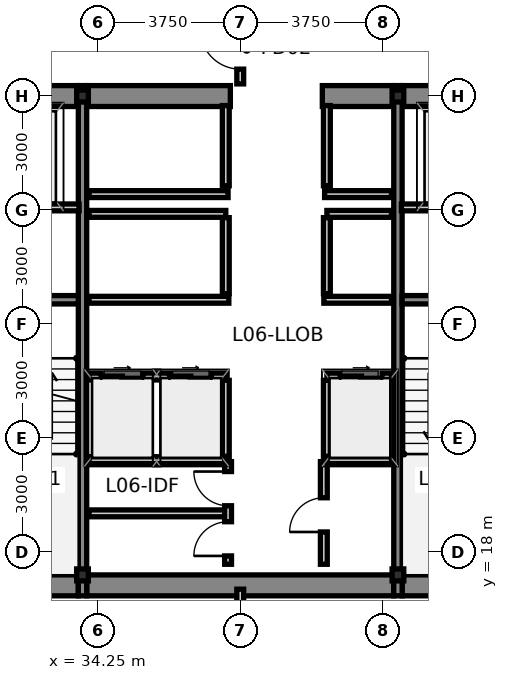
"""IFC4 building model, lengths in metres.
Left out: names, types, materials, properties, quantities, classifications, styles, units other than length and angle.
Written with IfcOpenShell. Run it as: python <this file> out.ifc"""

import sys

from ifc_helpers import new_model, si_unit, direction, frame, frame_2d, origin, origin_2d, place, context, subcontext, project, spatial, rectangle, i_section, extrude, source, transform, mapped, element, fill, save


model = new_model("IFC4")
c1 = context("Model", 3, precision=1e-05, world=origin(), true_north=direction((0.0, 1.0)))
c2 = subcontext(c1, "Body", "Model", "MODEL_VIEW")
j1 = project(units=[si_unit("LENGTHUNIT", "METRE"), si_unit("PLANEANGLEUNIT", "RADIAN")], contexts=[c1])
p1 = place(None, origin())
s1 = spatial("IfcSite", under=j1, at=p1, CompositionType="ELEMENT")
p2 = place(p1, origin())
s2 = spatial("IfcBuilding", under=s1, at=p2, CompositionType="ELEMENT")
p3 = place(p2, frame((0.0, 0.0, 27.6)))
s3 = spatial("IfcBuildingStorey", under=s2, at=p3, CompositionType="ELEMENT", Elevation=27.6)
m1 = source(origin(), c2, "Body", "SweptSolid", [
    extrude(i_section(OverallWidth=0.307, OverallDepth=0.315, WebThickness=0.012, FlangeThickness=0.019, at=origin_2d()), origin(), (0.0, 0.0, 1.0), 3.65),
])
for number, where, z_axis, x_axis in (
    (1, (33.85, 17.4, 0.0), (0.0, 0.0, 1.0), (1.0, 0.0, 0.0)),
    (2, (42.15, 17.4, 0.0), (0.0, 0.0, 1.0), (1.0, 0.0, 0.0)),
    (3, (33.85, 30.0, 0.0), (0.0, 0.0, 1.0), (1.0, 0.0, 0.0)),
    (4, (42.15, 30.0, 0.0), (0.0, 0.0, 1.0), (1.0, 0.0, 0.0)),
):
    element("IfcColumn", number, at=place(p3, frame(where, z_axis=z_axis, x_axis=x_axis)), inside=s3, PredefinedType="COLUMN", context=c2, shape_type="MappedRepresentation", body=[
        mapped(m1, transform((0.0, 0.0, 0.0), scale=1.0)),
    ])
p4 = place(p3, frame((30.84, 17.125, 0.0), z_axis=(0.0, 0.0, 1.0), x_axis=(1.0, 0.0, 0.0)))
e5 = element("IfcWall", 5, at=p4, inside=s3, PredefinedType="SHEAR", context=c2, shape_type="SweptSolid", body=[
    extrude(rectangle(XDim=2.9, YDim=0.55, at=frame_2d((1.45, 0.0))), origin(), (0.0, 0.0, 1.0), 3.65),
])
p5 = place(p3, frame((33.96, 17.125, 0.0), z_axis=(0.0, 0.0, 1.0), x_axis=(1.0, 0.0, 0.0)))
e6 = element("IfcWall", 6, at=p5, inside=s3, PredefinedType="SHEAR", context=c2, shape_type="SweptSolid", body=[
    extrude(rectangle(XDim=8.08, YDim=0.55, at=frame_2d((4.04, 0.0))), origin(), (0.0, 0.0, 1.0), 3.65),
])
for number, where, z_axis, x_axis in (
    (7, (42.26, 17.125, 0.0), (0.0, 0.0, 1.0), (1.0, 0.0, 0.0)),
    (8, (30.84, 30.0, 0.0), (0.0, 0.0, 1.0), (1.0, 0.0, 0.0)),
):
    element("IfcWall", number, at=place(p3, frame(where, z_axis=z_axis, x_axis=x_axis)), inside=s3, PredefinedType="SHEAR", context=c2, shape_type="SweptSolid", body=[
        extrude(rectangle(XDim=2.9, YDim=0.55, at=frame_2d((1.45, 0.0))), origin(), (0.0, 0.0, 1.0), 3.65),
    ])
p6 = place(p3, frame((33.96, 30.0, 0.0), z_axis=(0.0, 0.0, 1.0), x_axis=(1.0, 0.0, 0.0)))
e9 = element("IfcWall", 9, at=p6, inside=s3, PredefinedType="SHEAR", context=c2, shape_type="SweptSolid", body=[
    extrude(rectangle(XDim=3.78, YDim=0.55, at=frame_2d((1.89, 0.0))), origin(), (0.0, 0.0, 1.0), 3.65),
])
p7 = place(p3, frame((40.16, 30.0, 0.0), z_axis=(0.0, 0.0, 1.0), x_axis=(1.0, 0.0, 0.0)))
e10 = element("IfcWall", 10, at=p7, inside=s3, PredefinedType="SHEAR", context=c2, shape_type="SweptSolid", body=[
    extrude(rectangle(XDim=1.88, YDim=0.55, at=frame_2d((0.94, 0.0))), origin(), (0.0, 0.0, 1.0), 3.65),
])
p8 = place(p3, frame((42.26, 30.0, 0.0), z_axis=(0.0, 0.0, 1.0), x_axis=(1.0, 0.0, 0.0)))
e11 = element("IfcWall", 11, at=p8, inside=s3, PredefinedType="SHEAR", context=c2, shape_type="SweptSolid", body=[
    extrude(rectangle(XDim=2.9, YDim=0.55, at=frame_2d((1.45, 0.0))), origin(), (0.0, 0.0, 1.0), 3.65),
])
for number, where, z_axis, x_axis in (
    (12, (33.85, 16.85, 0.0), (0.0, 0.0, 1.0), (0.0, 1.0, 0.0)),
    (13, (42.15, 16.85, 0.0), (0.0, 0.0, 1.0), (0.0, 1.0, 0.0)),
):
    element("IfcWall", number, at=place(p3, frame(where, z_axis=z_axis, x_axis=x_axis)), inside=s3, PredefinedType="SHEAR", context=c2, shape_type="SweptSolid", body=[
        extrude(rectangle(XDim=13.425, YDim=0.22, at=frame_2d((6.712, 0.0))), origin(), (0.0, 0.0, 1.0), 3.65),
    ])
for number, where, z_axis, x_axis in (
    (14, (30.84, 24.64, 0.0), (0.0, 0.0, 1.0), (1.0, 0.0, 0.0)),
    (15, (42.26, 24.64, 0.0), (0.0, 0.0, 1.0), (1.0, 0.0, 0.0)),
):
    element("IfcWall", number, at=place(p3, frame(where, z_axis=z_axis, x_axis=x_axis)), inside=s3, PredefinedType="SHEAR", context=c2, shape_type="SweptSolid", body=[
        extrude(rectangle(XDim=2.9, YDim=0.22, at=frame_2d((1.45, 0.0))), origin(), (0.0, 0.0, 1.0), 3.65),
    ])
p9 = place(p3, frame((34.02, 22.62, 0.0), z_axis=(0.0, 0.0, 1.0), x_axis=(1.0, 0.0, 0.0)))
e16 = element("IfcWall", 16, at=p9, inside=s3, PredefinedType="PARTITIONING", context=c2, shape_type="SweptSolid", body=[
    extrude(rectangle(XDim=3.6, YDim=0.18, at=frame_2d((1.8, 0.0))), origin(), (0.0, 0.0, 1.0), 3.4),
])
p10 = place(p9, frame((0.32, 0.0, 0.0)))
e17 = element("IfcOpeningElement", 17, at=p10, cuts=e16, PredefinedType="OPENING", context=c2, shape_type="SweptSolid", body=[
    extrude(rectangle(XDim=1.1, YDim=2.2, at=frame_2d((0.55, 1.1))), frame((0.0, 0.102, 0.0), z_axis=(0.0, -1.0, 0.0), x_axis=(1.0, 0.0, 0.0)), (0.0, 0.0, 1.0), 0.204),
])
p11 = place(p9, frame((2.12, 0.0, 0.0)))
e18 = element("IfcOpeningElement", 18, at=p11, cuts=e16, PredefinedType="OPENING", context=c2, shape_type="SweptSolid", body=[
    extrude(rectangle(XDim=1.1, YDim=2.2, at=frame_2d((0.55, 1.1))), frame((0.0, 0.102, 0.0), z_axis=(0.0, -1.0, 0.0), x_axis=(1.0, 0.0, 0.0)), (0.0, 0.0, 1.0), 0.204),
])
p12 = place(p3, frame((40.28, 22.62, 0.0), z_axis=(0.0, 0.0, 1.0), x_axis=(1.0, 0.0, 0.0)))
e19 = element("IfcWall", 19, at=p12, inside=s3, PredefinedType="PARTITIONING", context=c2, shape_type="SweptSolid", body=[
    extrude(rectangle(XDim=1.7, YDim=0.18, at=frame_2d((0.85, 0.0))), origin(), (0.0, 0.0, 1.0), 3.4),
])
p13 = place(p12, frame((0.35, 0.0, 0.0)))
e20 = element("IfcOpeningElement", 20, at=p13, cuts=e19, PredefinedType="OPENING", context=c2, shape_type="SweptSolid", body=[
    extrude(rectangle(XDim=1.1, YDim=2.2, at=frame_2d((0.55, 1.1))), frame((0.0, 0.102, 0.0), z_axis=(0.0, -1.0, 0.0), x_axis=(1.0, 0.0, 0.0)), (0.0, 0.0, 1.0), 0.204),
])
for number, where, z_axis, x_axis in (
    (21, (37.62, 20.52, 0.0), (0.0, 0.0, 1.0), (0.0, 1.0, 0.0)),
    (22, (40.28, 20.52, 0.0), (0.0, 0.0, 1.0), (0.0, 1.0, 0.0)),
):
    element("IfcWall", number, at=place(p3, frame(where, z_axis=z_axis, x_axis=x_axis)), inside=s3, PredefinedType="PARTITIONING", context=c2, shape_type="SweptSolid", body=[
        extrude(rectangle(XDim=2.0, YDim=0.18, at=frame_2d((1.0, 0.0))), origin(), (0.0, 0.0, 1.0), 3.4),
    ])
p14 = place(p3, frame((34.02, 26.9, 0.0), z_axis=(0.0, 0.0, 1.0), x_axis=(1.0, 0.0, 0.0)))
e23 = element("IfcWall", 23, at=p14, inside=s3, PredefinedType="PARTITIONING", context=c2, shape_type="SweptSolid", body=[
    extrude(rectangle(XDim=3.6, YDim=0.18, at=frame_2d((1.8, 0.0))), origin(), (0.0, 0.0, 1.0), 3.4),
])
p15 = place(p3, frame((40.28, 26.9, 0.0), z_axis=(0.0, 0.0, 1.0), x_axis=(1.0, 0.0, 0.0)))
e24 = element("IfcWall", 24, at=p15, inside=s3, PredefinedType="PARTITIONING", context=c2, shape_type="SweptSolid", body=[
    extrude(rectangle(XDim=1.7, YDim=0.18, at=frame_2d((0.85, 0.0))), origin(), (0.0, 0.0, 1.0), 3.4),
])
for number, where, z_axis, x_axis in (
    (25, (37.62, 24.8, 0.0), (0.0, 0.0, 1.0), (0.0, 1.0, 0.0)),
    (26, (40.28, 24.8, 0.0), (0.0, 0.0, 1.0), (0.0, 1.0, 0.0)),
):
    element("IfcWall", number, at=place(p3, frame(where, z_axis=z_axis, x_axis=x_axis)), inside=s3, PredefinedType="PARTITIONING", context=c2, shape_type="SweptSolid", body=[
        extrude(rectangle(XDim=2.0, YDim=0.18, at=frame_2d((1.0, 0.0))), origin(), (0.0, 0.0, 1.0), 3.4),
    ])
p16 = place(p3, frame((34.02, 24.64, 0.0), z_axis=(0.0, 0.0, 1.0), x_axis=(1.0, 0.0, 0.0)))
e27 = element("IfcWall", 27, at=p16, inside=s3, PredefinedType="PARTITIONING", context=c2, shape_type="SweptSolid", body=[
    extrude(rectangle(XDim=3.68, YDim=0.18, at=frame_2d((1.84, 0.0))), origin(), (0.0, 0.0, 1.0), 3.4),
])
p17 = place(p3, frame((40.2, 24.64, 0.0), z_axis=(0.0, 0.0, 1.0), x_axis=(1.0, 0.0, 0.0)))
e28 = element("IfcWall", 28, at=p17, inside=s3, PredefinedType="PARTITIONING", context=c2, shape_type="SweptSolid", body=[
    extrude(rectangle(XDim=1.78, YDim=0.18, at=frame_2d((0.89, 0.0))), origin(), (0.0, 0.0, 1.0), 3.4),
])
p18 = place(p3, frame((34.02, 27.42, 0.0), z_axis=(0.0, 0.0, 1.0), x_axis=(1.0, 0.0, 0.0)))
e29 = element("IfcWall", 29, at=p18, inside=s3, PredefinedType="PARTITIONING", context=c2, shape_type="SweptSolid", body=[
    extrude(rectangle(XDim=3.66, YDim=0.18, at=frame_2d((1.83, 0.0))), origin(), (0.0, 0.0, 1.0), 3.4),
])
p19 = place(p3, frame((40.22, 27.42, 0.0), z_axis=(0.0, 0.0, 1.0), x_axis=(1.0, 0.0, 0.0)))
e30 = element("IfcWall", 30, at=p19, inside=s3, PredefinedType="PARTITIONING", context=c2, shape_type="SweptSolid", body=[
    extrude(rectangle(XDim=1.76, YDim=0.18, at=frame_2d((0.88, 0.0))), origin(), (0.0, 0.0, 1.0), 3.4),
])
for number, where, z_axis, x_axis in (
    (31, (37.62, 27.64, 0.0), (0.0, 0.0, 1.0), (0.0, 1.0, 0.0)),
    (32, (40.28, 27.64, 0.0), (0.0, 0.0, 1.0), (0.0, 1.0, 0.0)),
):
    element("IfcWall", number, at=place(p3, frame(where, z_axis=z_axis, x_axis=x_axis)), inside=s3, PredefinedType="PARTITIONING", context=c2, shape_type="SweptSolid", body=[
        extrude(rectangle(XDim=2.11, YDim=0.18, at=frame_2d((1.055, 0.0))), origin(), (0.0, 0.0, 1.0), 3.4),
    ])
for number, where, z_axis, x_axis in (
    (33, (30.86, 27.07, 0.0), (0.0, 0.0, 1.0), (1.0, 0.0, 0.0)),
    (34, (42.24, 27.07, 0.0), (0.0, 0.0, 1.0), (1.0, 0.0, 0.0)),
):
    element("IfcWall", number, at=place(p3, frame(where, z_axis=z_axis, x_axis=x_axis)), inside=s3, PredefinedType="PARTITIONING", context=c2, shape_type="SweptSolid", body=[
        extrude(rectangle(XDim=2.9, YDim=0.18, at=frame_2d((1.45, 0.0))), origin(), (0.0, 0.0, 1.0), 3.4),
    ])
p20 = place(p3, frame((34.02, 20.42, 0.0), z_axis=(0.0, 0.0, 1.0), x_axis=(1.0, 0.0, 0.0)))
e35 = element("IfcWall", 35, at=p20, inside=s3, PredefinedType="PARTITIONING", context=c2, shape_type="SweptSolid", body=[
    extrude(rectangle(XDim=3.64, YDim=0.18, at=frame_2d((1.82, 0.0))), origin(), (0.0, 0.0, 1.0), 3.4),
])
p21 = place(p3, frame((40.22, 20.42, 0.0), z_axis=(0.0, 0.0, 1.0), x_axis=(1.0, 0.0, 0.0)))
e36 = element("IfcWall", 36, at=p21, inside=s3, PredefinedType="PARTITIONING", context=c2, shape_type="SweptSolid", body=[
    extrude(rectangle(XDim=1.76, YDim=0.18, at=frame_2d((0.88, 0.0))), origin(), (0.0, 0.0, 1.0), 3.4),
])
p22 = place(p3, frame((34.02, 19.02, 0.0), z_axis=(0.0, 0.0, 1.0), x_axis=(1.0, 0.0, 0.0)))
e37 = element("IfcWall", 37, at=p22, inside=s3, PredefinedType="PARTITIONING", context=c2, shape_type="SweptSolid", body=[
    extrude(rectangle(XDim=3.58, YDim=0.18, at=frame_2d((1.79, 0.0))), origin(), (0.0, 0.0, 1.0), 3.4),
])
p23 = place(p3, frame((37.68, 17.68, 0.0), z_axis=(0.0, 0.0, 1.0), x_axis=(0.0, 1.0, 0.0)))
e38 = element("IfcWall", 38, at=p23, inside=s3, PredefinedType="PARTITIONING", context=c2, shape_type="SweptSolid", body=[
    extrude(rectangle(XDim=2.7, YDim=0.18, at=frame_2d((1.35, 0.0))), origin(), (0.0, 0.0, 1.0), 3.4),
])
p24 = place(p23, frame((0.22, 0.0, 0.0)))
e39 = element("IfcOpeningElement", 39, at=p24, cuts=e38, PredefinedType="OPENING", context=c2, shape_type="SweptSolid", body=[
    extrude(rectangle(XDim=0.9, YDim=2.1, at=frame_2d((0.45, 1.05))), frame((0.0, 0.102, 0.0), z_axis=(0.0, -1.0, 0.0), x_axis=(1.0, 0.0, 0.0)), (0.0, 0.0, 1.0), 0.204),
])
p25 = place(p23, frame((1.54, 0.0, 0.0)))
e40 = element("IfcOpeningElement", 40, at=p25, cuts=e38, PredefinedType="OPENING", context=c2, shape_type="SweptSolid", body=[
    extrude(rectangle(XDim=0.9, YDim=2.1, at=frame_2d((0.45, 1.05))), frame((0.0, 0.102, 0.0), z_axis=(0.0, -1.0, 0.0), x_axis=(1.0, 0.0, 0.0)), (0.0, 0.0, 1.0), 0.204),
])
p26 = place(p3, frame((40.2, 17.68, 0.0), z_axis=(0.0, 0.0, 1.0), x_axis=(0.0, 1.0, 0.0)))
e41 = element("IfcWall", 41, at=p26, inside=s3, PredefinedType="PARTITIONING", context=c2, shape_type="SweptSolid", body=[
    extrude(rectangle(XDim=2.7, YDim=0.18, at=frame_2d((1.35, 0.0))), origin(), (0.0, 0.0, 1.0), 3.4),
])
p27 = place(p26, frame((0.85, 0.0, 0.0)))
e42 = element("IfcOpeningElement", 42, at=p27, cuts=e41, PredefinedType="OPENING", context=c2, shape_type="SweptSolid", body=[
    extrude(rectangle(XDim=0.9, YDim=2.1, at=frame_2d((0.45, 1.05))), frame((0.0, 0.102, 0.0), z_axis=(0.0, -1.0, 0.0), x_axis=(1.0, 0.0, 0.0)), (0.0, 0.0, 1.0), 0.204),
])
p28 = place(p3, frame((38.0, 15.205, 0.0), z_axis=(0.0, 0.0, 1.0), x_axis=(0.0, 1.0, 0.0)))
e43 = element("IfcWall", 43, at=p28, inside=s3, PredefinedType="PARTITIONING", context=c2, shape_type="SweptSolid", body=[
    extrude(rectangle(XDim=1.82, YDim=0.18, at=frame_2d((0.91, 0.0))), origin(), (0.0, 0.0, 1.0), 3.4),
])
p29 = place(p28, frame((0.385, 0.0, 0.0)))
e44 = element("IfcOpeningElement", 44, at=p29, cuts=e43, PredefinedType="OPENING", context=c2, shape_type="SweptSolid", body=[
    extrude(rectangle(XDim=1.05, YDim=2.15, at=frame_2d((0.525, 1.075))), frame((0.0, 0.102, 0.0), z_axis=(0.0, -1.0, 0.0), x_axis=(1.0, 0.0, 0.0)), (0.0, 0.0, 1.0), 0.204),
])
p30 = place(p3, frame((38.0, 30.32, 0.0), z_axis=(0.0, 0.0, 1.0), x_axis=(0.0, 1.0, 0.0)))
e45 = element("IfcWall", 45, at=p30, inside=s3, PredefinedType="PARTITIONING", context=c2, shape_type="SweptSolid", body=[
    extrude(rectangle(XDim=1.825, YDim=0.18, at=frame_2d((0.913, 0.0))), origin(), (0.0, 0.0, 1.0), 3.4),
])
p31 = place(p30, frame((0.388, 0.0, 0.0)))
e46 = element("IfcOpeningElement", 46, at=p31, cuts=e45, PredefinedType="OPENING", context=c2, shape_type="SweptSolid", body=[
    extrude(rectangle(XDim=1.05, YDim=2.15, at=frame_2d((0.525, 1.075))), frame((0.0, 0.102, 0.0), z_axis=(0.0, -1.0, 0.0), x_axis=(1.0, 0.0, 0.0)), (0.0, 0.0, 1.0), 0.204),
])
p32 = place(p10, origin())
e47 = element("IfcDoor", 47, at=p32, inside=s3, OperationType="SLIDING_TO_LEFT", PredefinedType="DOOR", context=c2, shape_type="SweptSolid", body=[
    extrude(rectangle(XDim=1.1, YDim=2.2, at=frame_2d((0.55, 1.1))), frame((0.0, 0.025, 0.0), z_axis=(0.0, -1.0, 0.0), x_axis=(1.0, 0.0, 0.0)), (0.0, 0.0, 1.0), 0.05),
])
fill(e17, e47)
p33 = place(p11, origin())
e48 = element("IfcDoor", 48, at=p33, inside=s3, OperationType="SLIDING_TO_RIGHT", PredefinedType="DOOR", context=c2, shape_type="SweptSolid", body=[
    extrude(rectangle(XDim=1.1, YDim=2.2, at=frame_2d((0.55, 1.1))), frame((0.0, 0.025, 0.0), z_axis=(0.0, -1.0, 0.0), x_axis=(1.0, 0.0, 0.0)), (0.0, 0.0, 1.0), 0.05),
])
fill(e18, e48)
p34 = place(p13, origin())
e49 = element("IfcDoor", 49, at=p34, inside=s3, OperationType="SLIDING_TO_LEFT", PredefinedType="DOOR", context=c2, shape_type="SweptSolid", body=[
    extrude(rectangle(XDim=1.1, YDim=2.2, at=frame_2d((0.55, 1.1))), frame((0.0, 0.025, 0.0), z_axis=(0.0, -1.0, 0.0), x_axis=(1.0, 0.0, 0.0)), (0.0, 0.0, 1.0), 0.05),
])
fill(e20, e49)
p35 = place(p24, origin())
e50 = element("IfcDoor", 50, at=p35, inside=s3, OperationType="SINGLE_SWING_LEFT", PredefinedType="DOOR", context=c2, shape_type="SweptSolid", body=[
    extrude(rectangle(XDim=0.9, YDim=2.1, at=frame_2d((0.45, 1.05))), frame((0.0, 0.025, 0.0), z_axis=(0.0, -1.0, 0.0), x_axis=(1.0, 0.0, 0.0)), (0.0, 0.0, 1.0), 0.05),
])
fill(e39, e50)
p36 = place(p25, origin())
e51 = element("IfcDoor", 51, at=p36, inside=s3, OperationType="SINGLE_SWING_RIGHT", PredefinedType="DOOR", context=c2, shape_type="SweptSolid", body=[
    extrude(rectangle(XDim=0.9, YDim=2.1, at=frame_2d((0.45, 1.05))), frame((0.0, 0.025, 0.0), z_axis=(0.0, -1.0, 0.0), x_axis=(1.0, 0.0, 0.0)), (0.0, 0.0, 1.0), 0.05),
])
fill(e40, e51)
p37 = place(p27, origin())
e52 = element("IfcDoor", 52, at=p37, inside=s3, OperationType="SINGLE_SWING_LEFT", PredefinedType="DOOR", context=c2, shape_type="SweptSolid", body=[
    extrude(rectangle(XDim=0.9, YDim=2.1, at=frame_2d((0.45, 1.05))), frame((0.0, 0.025, 0.0), z_axis=(0.0, -1.0, 0.0), x_axis=(1.0, 0.0, 0.0)), (0.0, 0.0, 1.0), 0.05),
])
fill(e42, e52)
p38 = place(p31, origin())
e53 = element("IfcDoor", 53, at=p38, inside=s3, OperationType="SINGLE_SWING_RIGHT", PredefinedType="DOOR", context=c2, shape_type="SweptSolid", body=[
    extrude(rectangle(XDim=1.05, YDim=2.15, at=frame_2d((0.525, 1.075))), frame((0.0, 0.025, 0.0), z_axis=(0.0, -1.0, 0.0), x_axis=(1.0, 0.0, 0.0)), (0.0, 0.0, 1.0), 0.05),
])
fill(e46, e53)
save(model, sys.argv[1])
